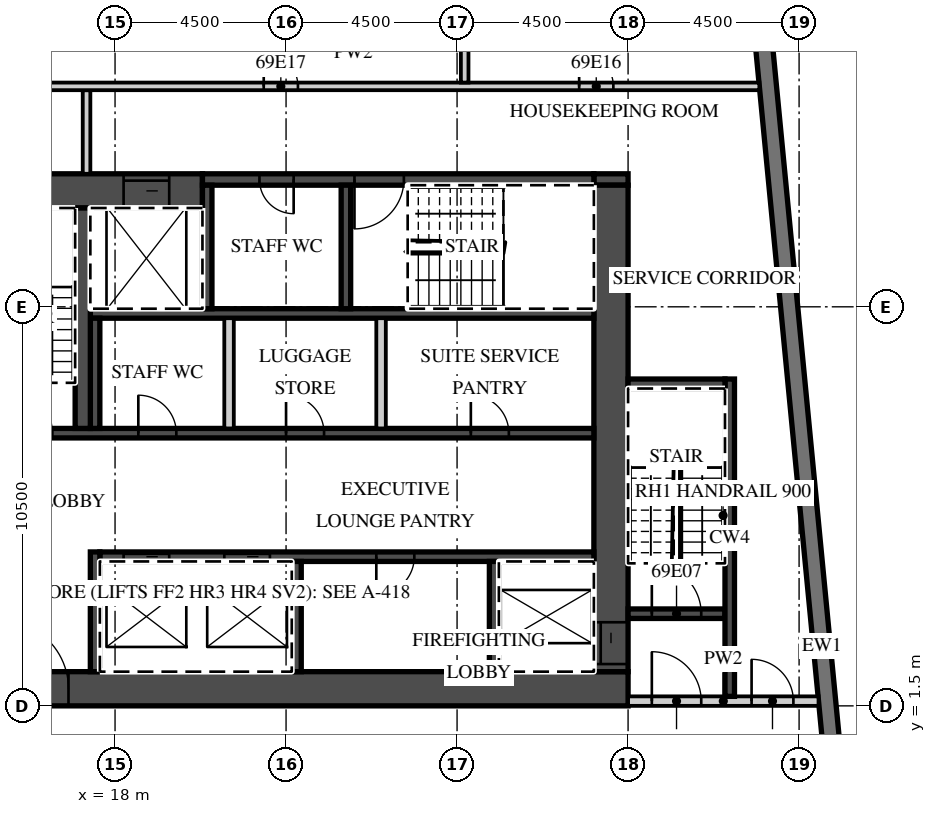
"""IFC4 building model, lengths in metres.
Left out: names, types, materials, properties, quantities, classifications, styles, units other than length and angle.
Written with IfcOpenShell. Run it as: python <this file> out.ifc"""

import sys

from ifc_helpers import new_model, si_unit, direction, frame, frame_2d, origin, place, context, subcontext, project, spatial, rectangle, extrude, element, fill, save


model = new_model("IFC4")
c1 = context("Model", 3, precision=1e-05, world=origin(), true_north=direction((0.0, 1.0)))
c2 = subcontext(c1, "Body", "Model", "MODEL_VIEW")
j1 = project(units=[si_unit("LENGTHUNIT", "METRE"), si_unit("PLANEANGLEUNIT", "RADIAN")], contexts=[c1])
p1 = place(None, origin())
s1 = spatial("IfcSite", under=j1, at=p1, CompositionType="ELEMENT")
p2 = place(p1, origin())
s2 = spatial("IfcBuilding", under=s1, at=p2, CompositionType="ELEMENT")
p3 = place(p2, frame((0.0, 0.0, 278.4)))
s3 = spatial("IfcBuildingStorey", under=s2, at=p3, CompositionType="ELEMENT", Elevation=278.4)
p4 = place(p3, frame((38.132, -12.858, 0.0), z_axis=(0.0, 0.0, 1.0), x_axis=(-0.095847749461, 0.995396006082, 0.0)))
e1 = element("IfcWall", 1, at=p4, inside=s3, PredefinedType="SOLIDWALL", context=c2, shape_type="SweptSolid", body=[
    extrude(rectangle(XDim=32.0, YDim=0.45, at=frame_2d((16.0, 0.0))), origin(), (0.0, 0.0, 1.0), 3.02),
])
p5 = place(p3, frame((13.5, 1.95, 0.0), z_axis=(0.0, 0.0, 1.0), x_axis=(1.0, 0.0, 0.0)))
e2 = element("IfcWall", 2, at=p5, inside=s3, PredefinedType="SHEAR", context=c2, shape_type="SweptSolid", body=[
    extrude(rectangle(XDim=18.0, YDim=0.9, at=frame_2d((9.0, 0.0))), origin(), (0.0, 0.0, 1.0), 3.02),
])
p6 = place(p5, frame((1.475, 0.0, 0.0)))
e3 = element("IfcOpeningElement", 3, at=p6, cuts=e2, PredefinedType="OPENING", context=c2, shape_type="SweptSolid", body=[
    extrude(rectangle(XDim=1.8, YDim=2.1, at=frame_2d((0.9, 1.05))), frame((0.0, 0.46, 0.0), z_axis=(0.0, -1.0, 0.0), x_axis=(1.0, 0.0, 0.0)), (0.0, 0.0, 1.0), 0.92),
])
p7 = place(p3, frame((13.5, 15.05, 0.0), z_axis=(0.0, 0.0, 1.0), x_axis=(1.0, 0.0, 0.0)))
e4 = element("IfcWall", 4, at=p7, inside=s3, PredefinedType="SHEAR", context=c2, shape_type="SweptSolid", body=[
    extrude(rectangle(XDim=6.8, YDim=0.9, at=frame_2d((3.4, 0.0))), origin(), (0.0, 0.0, 1.0), 3.02),
])
p8 = place(p7, frame((4.725, 0.0, 0.0)))
e5 = element("IfcOpeningElement", 5, at=p8, cuts=e4, PredefinedType="OPENING", context=c2, shape_type="SweptSolid", body=[
    extrude(rectangle(XDim=1.2, YDim=2.1, at=frame_2d((0.6, 1.05))), frame((0.0, 0.46, 0.0), z_axis=(0.0, -1.0, 0.0), x_axis=(1.0, 0.0, 0.0)), (0.0, 0.0, 1.0), 0.92),
])
p9 = place(p3, frame((30.6, 15.35, 0.0), z_axis=(0.0, 0.0, 1.0), x_axis=(1.0, 0.0, 0.0)))
e6 = element("IfcWall", 6, at=p9, inside=s3, PredefinedType="SHEAR", context=c2, shape_type="SweptSolid", body=[
    extrude(rectangle(XDim=0.9, YDim=0.3, at=frame_2d((0.45, 0.0))), origin(), (0.0, 0.0, 1.0), 3.02),
])
p10 = place(p3, frame((20.3, 15.35, 0.0), z_axis=(0.0, 0.0, 1.0), x_axis=(1.0, 0.0, 0.0)))
e7 = element("IfcWall", 7, at=p10, inside=s3, PredefinedType="SHEAR", context=c2, shape_type="SweptSolid", body=[
    extrude(rectangle(XDim=10.3, YDim=0.3, at=frame_2d((5.15, 0.0))), origin(), (0.0, 0.0, 1.0), 3.02),
])
p11 = place(p10, frame((4.0, 0.0, 0.0)))
e8 = element("IfcOpeningElement", 8, at=p11, cuts=e7, PredefinedType="OPENING", context=c2, shape_type="SweptSolid", body=[
    extrude(rectangle(XDim=1.3, YDim=2.1, at=frame_2d((0.65, 1.05))), frame((0.0, 0.16, 0.0), z_axis=(0.0, -1.0, 0.0), x_axis=(1.0, 0.0, 0.0)), (0.0, 0.0, 1.0), 0.32),
])
p12 = place(p10, frame((1.5, 0.0, 0.0)))
e9 = element("IfcOpeningElement", 9, at=p12, cuts=e7, PredefinedType="OPENING", context=c2, shape_type="SweptSolid", body=[
    extrude(rectangle(XDim=0.9, YDim=2.1, at=frame_2d((0.45, 1.05))), frame((0.0, 0.16, 0.0), z_axis=(0.0, -1.0, 0.0), x_axis=(1.0, 0.0, 0.0)), (0.0, 0.0, 1.0), 0.32),
])
p13 = place(p3, frame((31.05, 2.4, 0.0), z_axis=(0.0, 0.0, 1.0), x_axis=(0.0, 1.0, 0.0)))
e10 = element("IfcWall", 10, at=p13, inside=s3, PredefinedType="SHEAR", context=c2, shape_type="SweptSolid", body=[
    extrude(rectangle(XDim=12.8, YDim=0.9, at=frame_2d((6.4, 0.0))), origin(), (0.0, 0.0, 1.0), 3.02),
])
p14 = place(p13, frame((0.2, 0.0, 0.0)))
e11 = element("IfcOpeningElement", 11, at=p14, cuts=e10, PredefinedType="OPENING", context=c2, shape_type="SweptSolid", body=[
    extrude(rectangle(XDim=1.1, YDim=2.1, at=frame_2d((0.55, 1.05))), frame((0.0, 0.46, 0.0), z_axis=(0.0, -1.0, 0.0), x_axis=(1.0, 0.0, 0.0)), (0.0, 0.0, 1.0), 0.92),
])
p15 = place(p3, frame((17.6, 5.425, 0.0), z_axis=(0.0, 0.0, 1.0), x_axis=(1.0, 0.0, 0.0)))
e12 = element("IfcWall", 12, at=p15, inside=s3, PredefinedType="SHEAR", context=c2, shape_type="SweptSolid", body=[
    extrude(rectangle(XDim=13.0, YDim=0.25, at=frame_2d((6.5, 0.0))), origin(), (0.0, 0.0, 1.0), 3.02),
])
p16 = place(p15, frame((3.275, 0.0, 0.0)))
e13 = element("IfcOpeningElement", 13, at=p16, cuts=e12, PredefinedType="OPENING", context=c2, shape_type="SweptSolid", body=[
    extrude(rectangle(XDim=1.2, YDim=2.1, at=frame_2d((0.6, 1.05))), frame((0.0, 0.135, 0.0), z_axis=(0.0, -1.0, 0.0), x_axis=(1.0, 0.0, 0.0)), (0.0, 0.0, 1.0), 0.27),
])
p17 = place(p15, frame((0.625, 0.0, 0.0)))
e14 = element("IfcOpeningElement", 14, at=p17, cuts=e12, PredefinedType="OPENING", context=c2, shape_type="SweptSolid", body=[
    extrude(rectangle(XDim=1.2, YDim=2.1, at=frame_2d((0.6, 1.05))), frame((0.0, 0.135, 0.0), z_axis=(0.0, -1.0, 0.0), x_axis=(1.0, 0.0, 0.0)), (0.0, 0.0, 1.0), 0.27),
])
p18 = place(p15, frame((7.275, 0.0, 0.0)))
e15 = element("IfcOpeningElement", 15, at=p18, cuts=e12, PredefinedType="OPENING", context=c2, shape_type="SweptSolid", body=[
    extrude(rectangle(XDim=1.0, YDim=2.1, at=frame_2d((0.5, 1.05))), frame((0.0, 0.135, 0.0), z_axis=(0.0, -1.0, 0.0), x_axis=(1.0, 0.0, 0.0)), (0.0, 0.0, 1.0), 0.27),
])
p19 = place(p3, frame((17.475, 2.4, 0.0), z_axis=(0.0, 0.0, 1.0), x_axis=(0.0, 1.0, 0.0)))
e16 = element("IfcWall", 16, at=p19, inside=s3, PredefinedType="SHEAR", context=c2, shape_type="SweptSolid", body=[
    extrude(rectangle(XDim=3.15, YDim=0.25, at=frame_2d((1.575, 0.0))), origin(), (0.0, 0.0, 1.0), 3.02),
])
for number, where, z_axis, x_axis in (
    (17, (27.975, 2.4, 0.0), (0.0, 0.0, 1.0), (0.0, 1.0, 0.0)),
    (18, (22.775, 2.4, 0.0), (0.0, 0.0, 1.0), (0.0, 1.0, 0.0)),
):
    element("IfcWall", number, at=place(p3, frame(where, z_axis=z_axis, x_axis=x_axis)), inside=s3, PredefinedType="SHEAR", context=c2, shape_type="SweptSolid", body=[
        extrude(rectangle(XDim=2.9, YDim=0.25, at=frame_2d((1.45, 0.0))), origin(), (0.0, 0.0, 1.0), 3.02),
    ])
p20 = place(p3, frame((14.4, 8.675, 0.0), z_axis=(0.0, 0.0, 1.0), x_axis=(1.0, 0.0, 0.0)))
e19 = element("IfcWall", 19, at=p20, inside=s3, PredefinedType="SHEAR", context=c2, shape_type="SweptSolid", body=[
    extrude(rectangle(XDim=16.2, YDim=0.25, at=frame_2d((8.1, 0.0))), origin(), (0.0, 0.0, 1.0), 3.02),
])
p21 = place(p20, frame((0.65, 0.0, 0.0)))
e20 = element("IfcOpeningElement", 20, at=p21, cuts=e19, PredefinedType="OPENING", context=c2, shape_type="SweptSolid", body=[
    extrude(rectangle(XDim=1.3, YDim=2.1, at=frame_2d((0.65, 1.05))), frame((0.0, 0.135, 0.0), z_axis=(0.0, -1.0, 0.0), x_axis=(1.0, 0.0, 0.0)), (0.0, 0.0, 1.0), 0.27),
])
p22 = place(p20, frame((12.962, 0.0, 0.0)))
e21 = element("IfcOpeningElement", 21, at=p22, cuts=e19, PredefinedType="OPENING", context=c2, shape_type="SweptSolid", body=[
    extrude(rectangle(XDim=1.0, YDim=2.1, at=frame_2d((0.5, 1.05))), frame((0.0, 0.135, 0.0), z_axis=(0.0, -1.0, 0.0), x_axis=(1.0, 0.0, 0.0)), (0.0, 0.0, 1.0), 0.27),
])
p23 = place(p20, frame((8.1, 0.0, 0.0)))
e22 = element("IfcOpeningElement", 22, at=p23, cuts=e19, PredefinedType="OPENING", context=c2, shape_type="SweptSolid", body=[
    extrude(rectangle(XDim=1.0, YDim=2.1, at=frame_2d((0.5, 1.05))), frame((0.0, 0.135, 0.0), z_axis=(0.0, -1.0, 0.0), x_axis=(1.0, 0.0, 0.0)), (0.0, 0.0, 1.0), 0.27),
])
p24 = place(p20, frame((4.212, 0.0, 0.0)))
e23 = element("IfcOpeningElement", 23, at=p24, cuts=e19, PredefinedType="OPENING", context=c2, shape_type="SweptSolid", body=[
    extrude(rectangle(XDim=1.0, YDim=2.1, at=frame_2d((0.5, 1.05))), frame((0.0, 0.135, 0.0), z_axis=(0.0, -1.0, 0.0), x_axis=(1.0, 0.0, 0.0)), (0.0, 0.0, 1.0), 0.27),
])
p25 = place(p3, frame((17.35, 11.825, 0.0), z_axis=(0.0, 0.0, 1.0), x_axis=(1.0, 0.0, 0.0)))
e24 = element("IfcWall", 24, at=p25, inside=s3, PredefinedType="SHEAR", context=c2, shape_type="SweptSolid", body=[
    extrude(rectangle(XDim=13.25, YDim=0.25, at=frame_2d((6.625, 0.0))), origin(), (0.0, 0.0, 1.0), 3.02),
])
p26 = place(p3, frame((17.475, 8.8, 0.0), z_axis=(0.0, 0.0, 1.0), x_axis=(0.0, 1.0, 0.0)))
e25 = element("IfcWall", 25, at=p26, inside=s3, PredefinedType="SHEAR", context=c2, shape_type="SweptSolid", body=[
    extrude(rectangle(XDim=2.9, YDim=0.25, at=frame_2d((1.45, 0.0))), origin(), (0.0, 0.0, 1.0), 3.02),
])
for number, where, z_axis, x_axis in (
    (26, (25.0, 8.8, 0.0), (0.0, 0.0, 1.0), (0.0, 1.0, 0.0)),
    (27, (21.0, 8.8, 0.0), (0.0, 0.0, 1.0), (0.0, 1.0, 0.0)),
):
    element("IfcWall", number, at=place(p3, frame(where, z_axis=z_axis, x_axis=x_axis)), inside=s3, PredefinedType="PARTITIONING", context=c2, shape_type="SweptSolid", body=[
        extrude(rectangle(XDim=2.9, YDim=0.25, at=frame_2d((1.45, 0.0))), origin(), (0.0, 0.0, 1.0), 3.02),
    ])
p27 = place(p3, frame((17.15, 8.8, 0.0), z_axis=(0.0, 0.0, 1.0), x_axis=(0.0, 1.0, 0.0)))
e28 = element("IfcWall", 28, at=p27, inside=s3, PredefinedType="SHEAR", context=c2, shape_type="SweptSolid", body=[
    extrude(rectangle(XDim=5.8, YDim=0.4, at=frame_2d((2.9, 0.0))), origin(), (0.0, 0.0, 1.0), 3.02),
])
for number, where, z_axis, x_axis in (
    (29, (20.425, 11.95, 0.0), (0.0, 0.0, 1.0), (0.0, 1.0, 0.0)),
    (30, (24.075, 11.95, 0.0), (0.0, 0.0, 1.0), (0.0, 1.0, 0.0)),
):
    element("IfcWall", number, at=place(p3, frame(where, z_axis=z_axis, x_axis=x_axis)), inside=s3, PredefinedType="SHEAR", context=c2, shape_type="SweptSolid", body=[
        extrude(rectangle(XDim=3.25, YDim=0.25, at=frame_2d((1.625, 0.0))), origin(), (0.0, 0.0, 1.0), 3.02),
    ])
p28 = place(p3, frame((31.5, 1.625, 0.0), z_axis=(0.0, 0.0, 1.0), x_axis=(1.0, 0.0, 0.0)))
e31 = element("IfcWall", 31, at=p28, inside=s3, PredefinedType="PARTITIONING", context=c2, shape_type="SweptSolid", body=[
    extrude(rectangle(XDim=5.012, YDim=0.25, at=frame_2d((2.506, 0.0))), origin(), (0.0, 0.0, 1.0), 3.02),
])
p29 = place(p28, frame((0.625, 0.0, 0.0)))
e32 = element("IfcOpeningElement", 32, at=p29, cuts=e31, PredefinedType="OPENING", context=c2, shape_type="SweptSolid", body=[
    extrude(rectangle(XDim=1.3, YDim=2.1, at=frame_2d((0.65, 1.05))), frame((0.0, 0.135, 0.0), z_axis=(0.0, -1.0, 0.0), x_axis=(1.0, 0.0, 0.0)), (0.0, 0.0, 1.0), 0.27),
])
p30 = place(p28, frame((3.25, 0.0, 0.0)))
e33 = element("IfcOpeningElement", 33, at=p30, cuts=e31, PredefinedType="OPENING", context=c2, shape_type="SweptSolid", body=[
    extrude(rectangle(XDim=1.1, YDim=2.1, at=frame_2d((0.55, 1.05))), frame((0.0, 0.135, 0.0), z_axis=(0.0, -1.0, 0.0), x_axis=(1.0, 0.0, 0.0)), (0.0, 0.0, 1.0), 0.27),
])
p31 = place(p3, frame((31.5, 3.925, 0.0), z_axis=(0.0, 0.0, 1.0), x_axis=(1.0, 0.0, 0.0)))
e34 = element("IfcWall", 34, at=p31, inside=s3, PredefinedType="SHEAR", context=c2, shape_type="SweptSolid", body=[
    extrude(rectangle(XDim=2.55, YDim=0.25, at=frame_2d((1.275, 0.0))), origin(), (0.0, 0.0, 1.0), 3.02),
])
p32 = place(p31, frame((0.625, 0.0, 0.0)))
e35 = element("IfcOpeningElement", 35, at=p32, cuts=e34, PredefinedType="OPENING", context=c2, shape_type="SweptSolid", body=[
    extrude(rectangle(XDim=1.3, YDim=2.1, at=frame_2d((0.65, 1.05))), frame((0.0, 0.135, 0.0), z_axis=(0.0, -1.0, 0.0), x_axis=(1.0, 0.0, 0.0)), (0.0, 0.0, 1.0), 0.27),
])
p33 = place(p3, frame((34.175, 1.75, 0.0), z_axis=(0.0, 0.0, 1.0), x_axis=(0.0, 1.0, 0.0)))
e36 = element("IfcWall", 36, at=p33, inside=s3, PredefinedType="SHEAR", context=c2, shape_type="SweptSolid", body=[
    extrude(rectangle(XDim=8.35, YDim=0.25, at=frame_2d((4.175, 0.0))), origin(), (0.0, 0.0, 1.0), 3.02),
])
p34 = place(p3, frame((31.5, 9.975, 0.0), z_axis=(0.0, 0.0, 1.0), x_axis=(1.0, 0.0, 0.0)))
e37 = element("IfcWall", 37, at=p34, inside=s3, PredefinedType="SHEAR", context=c2, shape_type="SweptSolid", body=[
    extrude(rectangle(XDim=2.55, YDim=0.25, at=frame_2d((1.275, 0.0))), origin(), (0.0, 0.0, 1.0), 3.02),
])
p35 = place(p3, frame((17.25, 15.5, 0.0), z_axis=(0.0, 0.0, 1.0), x_axis=(0.0, 1.0, 0.0)))
e38 = element("IfcWall", 38, at=p35, inside=s3, PredefinedType="PARTITIONING", context=c2, shape_type="SweptSolid", body=[
    extrude(rectangle(XDim=2.2, YDim=0.2, at=frame_2d((1.1, 0.0))), origin(), (0.0, 0.0, 1.0), 3.02),
])
p36 = place(p3, frame((13.6, 17.8, 0.0), z_axis=(0.0, 0.0, 1.0), x_axis=(1.0, 0.0, 0.0)))
e39 = element("IfcWall", 39, at=p36, inside=s3, PredefinedType="PARTITIONING", context=c2, shape_type="SweptSolid", body=[
    extrude(rectangle(XDim=21.354, YDim=0.2, at=frame_2d((10.677, 0.0))), origin(), (0.0, 0.0, 1.0), 3.02),
])
p37 = place(p36, frame((16.613, 0.0, 0.0)))
e40 = element("IfcOpeningElement", 40, at=p37, cuts=e39, PredefinedType="OPENING", context=c2, shape_type="SweptSolid", body=[
    extrude(rectangle(XDim=0.9, YDim=2.1, at=frame_2d((0.45, 1.05))), frame((0.0, 0.11, 0.0), z_axis=(0.0, -1.0, 0.0), x_axis=(1.0, 0.0, 0.0)), (0.0, 0.0, 1.0), 0.22),
])
p38 = place(p36, frame((8.312, 0.0, 0.0)))
e41 = element("IfcOpeningElement", 41, at=p38, cuts=e39, PredefinedType="OPENING", context=c2, shape_type="SweptSolid", body=[
    extrude(rectangle(XDim=0.9, YDim=2.1, at=frame_2d((0.45, 1.05))), frame((0.0, 0.11, 0.0), z_axis=(0.0, -1.0, 0.0), x_axis=(1.0, 0.0, 0.0)), (0.0, 0.0, 1.0), 0.22),
])
p39 = place(p3, frame((27.2, 17.9, 0.0), z_axis=(0.0, 0.0, 1.0), x_axis=(0.0, 1.0, 0.0)))
e42 = element("IfcWall", 42, at=p39, inside=s3, PredefinedType="PARTITIONING", context=c2, shape_type="SweptSolid", body=[
    extrude(rectangle(XDim=3.905, YDim=0.2, at=frame_2d((1.953, 0.0))), origin(), (0.0, 0.0, 1.0), 3.02),
])
p40 = place(p16, origin())
e43 = element("IfcDoor", 43, at=p40, inside=s3, OperationType="SLIDING_TO_RIGHT", PredefinedType="DOOR", context=c2, shape_type="SweptSolid", body=[
    extrude(rectangle(XDim=1.2, YDim=2.1, at=frame_2d((0.6, 1.05))), frame((0.0, 0.025, 0.0), z_axis=(0.0, -1.0, 0.0), x_axis=(1.0, 0.0, 0.0)), (0.0, 0.0, 1.0), 0.05),
])
fill(e13, e43)
p41 = place(p17, origin())
e44 = element("IfcDoor", 44, at=p41, inside=s3, OperationType="SLIDING_TO_LEFT", PredefinedType="DOOR", context=c2, shape_type="SweptSolid", body=[
    extrude(rectangle(XDim=1.2, YDim=2.1, at=frame_2d((0.6, 1.05))), frame((0.0, 0.025, 0.0), z_axis=(0.0, -1.0, 0.0), x_axis=(1.0, 0.0, 0.0)), (0.0, 0.0, 1.0), 0.05),
])
fill(e14, e44)
p42 = place(p8, origin())
e45 = element("IfcDoor", 45, at=p42, inside=s3, OperationType="SLIDING_TO_LEFT", PredefinedType="DOOR", context=c2, shape_type="SweptSolid", body=[
    extrude(rectangle(XDim=1.2, YDim=2.1, at=frame_2d((0.6, 1.05))), frame((0.0, 0.025, 0.0), z_axis=(0.0, -1.0, 0.0), x_axis=(1.0, 0.0, 0.0)), (0.0, 0.0, 1.0), 0.05),
])
fill(e5, e45)
p43 = place(p14, origin())
e46 = element("IfcDoor", 46, at=p43, inside=s3, OperationType="SLIDING_TO_LEFT", PredefinedType="DOOR", context=c2, shape_type="SweptSolid", body=[
    extrude(rectangle(XDim=1.1, YDim=2.1, at=frame_2d((0.55, 1.05))), frame((0.0, 0.025, 0.0), z_axis=(0.0, -1.0, 0.0), x_axis=(1.0, 0.0, 0.0)), (0.0, 0.0, 1.0), 0.05),
])
fill(e11, e46)
p44 = place(p6, origin())
e47 = element("IfcDoor", 47, at=p44, inside=s3, OperationType="DOUBLE_DOOR_DOUBLE_SWING", PredefinedType="DOOR", context=c2, shape_type="SweptSolid", body=[
    extrude(rectangle(XDim=1.8, YDim=2.1, at=frame_2d((0.9, 1.05))), frame((0.0, 0.025, 0.0), z_axis=(0.0, -1.0, 0.0), x_axis=(1.0, 0.0, 0.0)), (0.0, 0.0, 1.0), 0.05),
])
fill(e3, e47)
p45 = place(p29, origin())
e48 = element("IfcDoor", 48, at=p45, inside=s3, OperationType="SINGLE_SWING_LEFT", PredefinedType="DOOR", context=c2, shape_type="SweptSolid", body=[
    extrude(rectangle(XDim=1.3, YDim=2.1, at=frame_2d((0.65, 1.05))), frame((0.0, 0.025, 0.0), z_axis=(0.0, -1.0, 0.0), x_axis=(1.0, 0.0, 0.0)), (0.0, 0.0, 1.0), 0.05),
])
fill(e32, e48)
p46 = place(p32, origin())
e49 = element("IfcDoor", 49, at=p46, inside=s3, OperationType="SINGLE_SWING_LEFT", PredefinedType="DOOR", context=c2, shape_type="SweptSolid", body=[
    extrude(rectangle(XDim=1.3, YDim=2.1, at=frame_2d((0.65, 1.05))), frame((0.0, 0.025, 0.0), z_axis=(0.0, -1.0, 0.0), x_axis=(1.0, 0.0, 0.0)), (0.0, 0.0, 1.0), 0.05),
])
fill(e35, e49)
p47 = place(p30, origin())
e50 = element("IfcDoor", 50, at=p47, inside=s3, OperationType="SINGLE_SWING_LEFT", PredefinedType="DOOR", context=c2, shape_type="SweptSolid", body=[
    extrude(rectangle(XDim=1.1, YDim=2.1, at=frame_2d((0.55, 1.05))), frame((0.0, 0.025, 0.0), z_axis=(0.0, -1.0, 0.0), x_axis=(1.0, 0.0, 0.0)), (0.0, 0.0, 1.0), 0.05),
])
fill(e33, e50)
p48 = place(p11, origin())
e51 = element("IfcDoor", 51, at=p48, inside=s3, OperationType="SINGLE_SWING_LEFT", PredefinedType="DOOR", context=c2, shape_type="SweptSolid", body=[
    extrude(rectangle(XDim=1.3, YDim=2.1, at=frame_2d((0.65, 1.05))), frame((0.0, 0.025, 0.0), z_axis=(0.0, -1.0, 0.0), x_axis=(1.0, 0.0, 0.0)), (0.0, 0.0, 1.0), 0.05),
])
fill(e8, e51)
p49 = place(p12, origin())
e52 = element("IfcDoor", 52, at=p49, inside=s3, OperationType="SINGLE_SWING_RIGHT", PredefinedType="DOOR", context=c2, shape_type="SweptSolid", body=[
    extrude(rectangle(XDim=0.9, YDim=2.1, at=frame_2d((0.45, 1.05))), frame((0.0, 0.025, 0.0), z_axis=(0.0, -1.0, 0.0), x_axis=(1.0, 0.0, 0.0)), (0.0, 0.0, 1.0), 0.05),
])
fill(e9, e52)
p50 = place(p22, origin())
e53 = element("IfcDoor", 53, at=p50, inside=s3, OperationType="SINGLE_SWING_LEFT", PredefinedType="DOOR", context=c2, shape_type="SweptSolid", body=[
    extrude(rectangle(XDim=1.0, YDim=2.1, at=frame_2d((0.5, 1.05))), frame((0.0, 0.025, 0.0), z_axis=(0.0, -1.0, 0.0), x_axis=(1.0, 0.0, 0.0)), (0.0, 0.0, 1.0), 0.05),
])
fill(e21, e53)
p51 = place(p23, origin())
e54 = element("IfcDoor", 54, at=p51, inside=s3, OperationType="SINGLE_SWING_LEFT", PredefinedType="DOOR", context=c2, shape_type="SweptSolid", body=[
    extrude(rectangle(XDim=1.0, YDim=2.1, at=frame_2d((0.5, 1.05))), frame((0.0, 0.025, 0.0), z_axis=(0.0, -1.0, 0.0), x_axis=(1.0, 0.0, 0.0)), (0.0, 0.0, 1.0), 0.05),
])
fill(e22, e54)
p52 = place(p24, origin())
e55 = element("IfcDoor", 55, at=p52, inside=s3, OperationType="SINGLE_SWING_LEFT", PredefinedType="DOOR", context=c2, shape_type="SweptSolid", body=[
    extrude(rectangle(XDim=1.0, YDim=2.1, at=frame_2d((0.5, 1.05))), frame((0.0, 0.025, 0.0), z_axis=(0.0, -1.0, 0.0), x_axis=(1.0, 0.0, 0.0)), (0.0, 0.0, 1.0), 0.05),
])
fill(e23, e55)
p53 = place(p18, origin())
e56 = element("IfcDoor", 56, at=p53, inside=s3, OperationType="SINGLE_SWING_LEFT", PredefinedType="DOOR", context=c2, shape_type="SweptSolid", body=[
    extrude(rectangle(XDim=1.0, YDim=2.1, at=frame_2d((0.5, 1.05))), frame((0.0, 0.025, 0.0), z_axis=(0.0, -1.0, 0.0), x_axis=(1.0, 0.0, 0.0)), (0.0, 0.0, 1.0), 0.05),
])
fill(e15, e56)
p54 = place(p37, origin())
e57 = element("IfcDoor", 57, at=p54, inside=s3, OperationType="SINGLE_SWING_LEFT", PredefinedType="DOOR", context=c2, shape_type="SweptSolid", body=[
    extrude(rectangle(XDim=0.9, YDim=2.1, at=frame_2d((0.45, 1.05))), frame((0.0, 0.025, 0.0), z_axis=(0.0, -1.0, 0.0), x_axis=(1.0, 0.0, 0.0)), (0.0, 0.0, 1.0), 0.05),
])
fill(e40, e57)
p55 = place(p38, origin())
e58 = element("IfcDoor", 58, at=p55, inside=s3, OperationType="SINGLE_SWING_LEFT", PredefinedType="DOOR", context=c2, shape_type="SweptSolid", body=[
    extrude(rectangle(XDim=0.9, YDim=2.1, at=frame_2d((0.45, 1.05))), frame((0.0, 0.025, 0.0), z_axis=(0.0, -1.0, 0.0), x_axis=(1.0, 0.0, 0.0)), (0.0, 0.0, 1.0), 0.05),
])
fill(e41, e58)
save(model, sys.argv[1])
